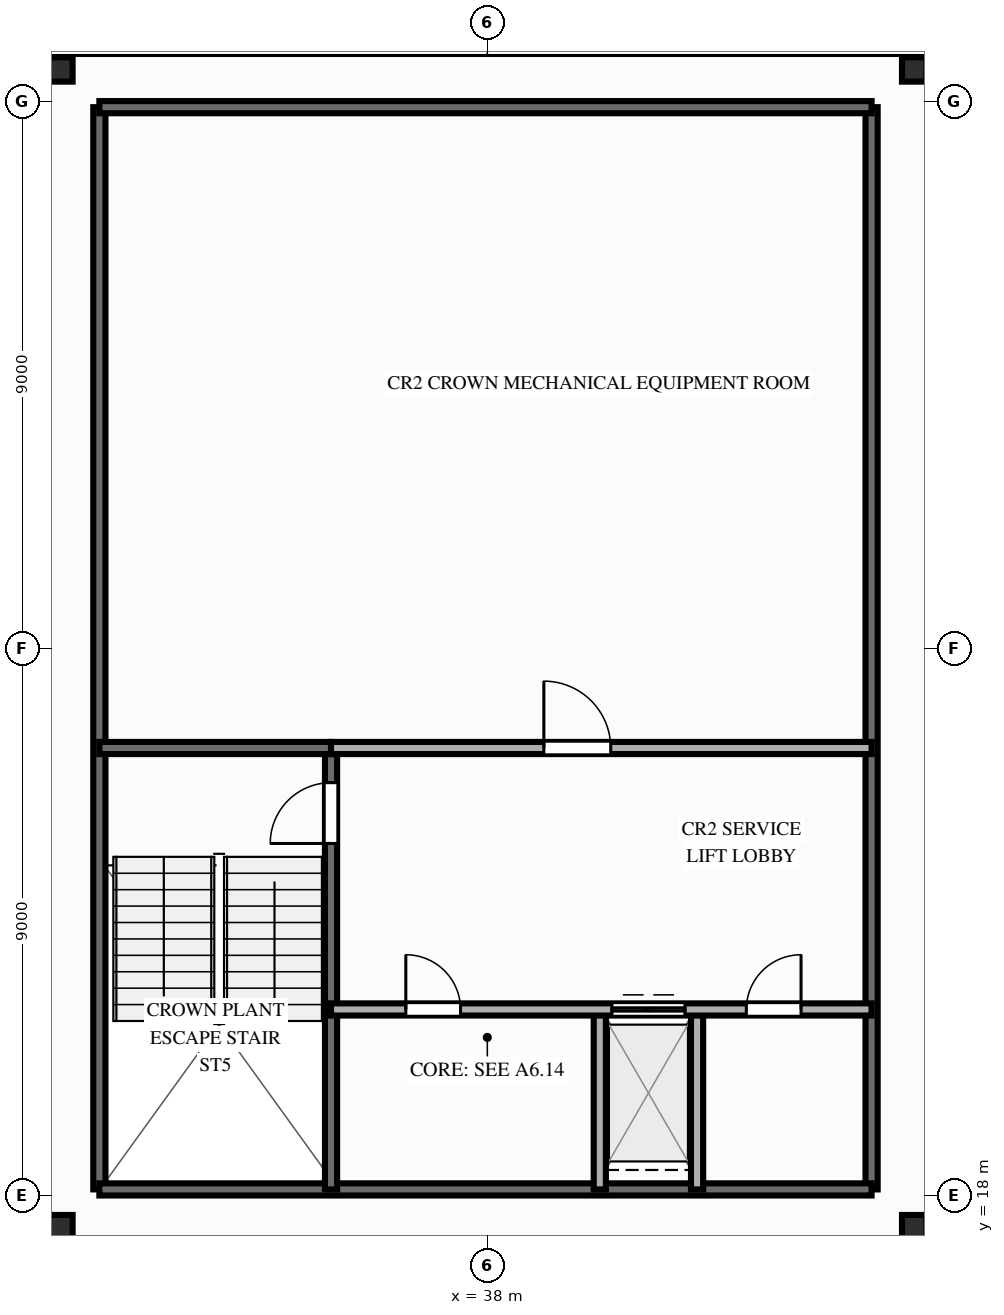
"""IFC4 building model, lengths in metres.
Left out: names, types, materials, properties, quantities, classifications, styles, units other than length and angle.
Written with IfcOpenShell. Run it as: python <this file> out.ifc"""

import sys

from ifc_helpers import new_model, si_unit, direction, frame, frame_2d, origin, origin_2d, place, context, subcontext, project, spatial, rectangle, i_section, extrude, source, transform, mapped, element, fill, save


model = new_model("IFC4")
c1 = context("Model", 3, precision=1e-05, world=origin(), true_north=direction((0.0, 1.0)))
c2 = subcontext(c1, "Body", "Model", "MODEL_VIEW")
j1 = project(units=[si_unit("LENGTHUNIT", "METRE"), si_unit("PLANEANGLEUNIT", "RADIAN")], contexts=[c1])
p1 = place(None, origin())
s1 = spatial("IfcSite", under=j1, at=p1, CompositionType="ELEMENT")
p2 = place(p1, origin())
s2 = spatial("IfcBuilding", under=s1, at=p2, CompositionType="ELEMENT")
p3 = place(p2, frame((0.0, 0.0, 256.0)))
s3 = spatial("IfcBuildingStorey", under=s2, at=p3, CompositionType="ELEMENT", Elevation=256.0)
m1 = source(origin(), c2, "Body", "SweptSolid", [
    extrude(i_section(OverallWidth=0.4, OverallDepth=0.4, WebThickness=0.013, FlangeThickness=0.021, at=origin_2d()), origin(), (0.0, 0.0, 1.0), 3.8),
])
for number, where, z_axis, x_axis in (
    (1, (30.98, 17.48, 0.0), (0.0, 0.0, 1.0), (1.0, 0.0, 0.0)),
    (2, (45.02, 17.48, 0.0), (0.0, 0.0, 1.0), (1.0, 0.0, 0.0)),
    (3, (30.98, 36.52, 0.0), (0.0, 0.0, 1.0), (1.0, 0.0, 0.0)),
    (4, (45.02, 36.52, 0.0), (0.0, 0.0, 1.0), (1.0, 0.0, 0.0)),
):
    element("IfcColumn", number, at=place(p3, frame(where, z_axis=z_axis, x_axis=x_axis)), inside=s3, PredefinedType="COLUMN", context=c2, shape_type="MappedRepresentation", body=[
        mapped(m1, transform((0.0, 0.0, 0.0), scale=1.0)),
    ])
for number, where, z_axis, x_axis in (
    (5, (31.62, 18.1, 0.0), (0.0, 0.0, 1.0), (0.0, 1.0, 0.0)),
    (6, (44.32, 18.1, 0.0), (0.0, 0.0, 1.0), (0.0, 1.0, 0.0)),
):
    element("IfcWall", number, at=place(p3, frame(where, z_axis=z_axis, x_axis=x_axis)), inside=s3, PredefinedType="SOLIDWALL", context=c2, shape_type="SweptSolid", body=[
        extrude(rectangle(XDim=17.8, YDim=0.2, at=frame_2d((8.9, 0.0))), origin(), (0.0, 0.0, 1.0), 3.55),
    ])
for number, where, z_axis, x_axis in (
    (7, (31.62, 18.1, 0.0), (0.0, 0.0, 1.0), (1.0, 0.0, 0.0)),
    (8, (31.62, 35.9, 0.0), (0.0, 0.0, 1.0), (1.0, 0.0, 0.0)),
):
    element("IfcWall", number, at=place(p3, frame(where, z_axis=z_axis, x_axis=x_axis)), inside=s3, PredefinedType="SOLIDWALL", context=c2, shape_type="SweptSolid", body=[
        extrude(rectangle(XDim=12.7, YDim=0.2, at=frame_2d((6.35, 0.0))), origin(), (0.0, 0.0, 1.0), 3.55),
    ])
p4 = place(p3, frame((35.43, 18.1, 0.0), z_axis=(0.0, 0.0, 1.0), x_axis=(0.0, 1.0, 0.0)))
e9 = element("IfcWall", 9, at=p4, inside=s3, PredefinedType="SOLIDWALL", context=c2, shape_type="SweptSolid", body=[
    extrude(rectangle(XDim=7.26, YDim=0.2, at=frame_2d((3.63, 0.0))), origin(), (0.0, 0.0, 1.0), 3.55),
])
p5 = place(p4, frame((6.69, 0.0, 0.0), z_axis=(0.0, 0.0, 1.0), x_axis=(-1.0, 0.0, 0.0)))
e10 = element("IfcOpeningElement", 10, at=p5, cuts=e9, PredefinedType="OPENING", context=c2, shape_type="SweptSolid", body=[
    extrude(rectangle(XDim=1.0, YDim=2.15, at=frame_2d((0.5, 1.075))), frame((0.0, 0.112, 0.0), z_axis=(0.0, -1.0, 0.0), x_axis=(1.0, 0.0, 0.0)), (0.0, 0.0, 1.0), 0.224),
])
p6 = place(p3, frame((31.62, 25.36, 0.0), z_axis=(0.0, 0.0, 1.0), x_axis=(1.0, 0.0, 0.0)))
e11 = element("IfcWall", 11, at=p6, inside=s3, PredefinedType="SOLIDWALL", context=c2, shape_type="SweptSolid", body=[
    extrude(rectangle(XDim=3.81, YDim=0.2, at=frame_2d((1.905, 0.0))), origin(), (0.0, 0.0, 1.0), 3.55),
])
for number, where, z_axis, x_axis in (
    (12, (39.85, 18.1, 0.0), (0.0, 0.0, 1.0), (0.0, 1.0, 0.0)),
    (13, (41.45, 18.1, 0.0), (0.0, 0.0, 1.0), (0.0, 1.0, 0.0)),
):
    element("IfcWall", number, at=place(p3, frame(where, z_axis=z_axis, x_axis=x_axis)), inside=s3, PredefinedType="PARTITIONING", context=c2, shape_type="SweptSolid", body=[
        extrude(rectangle(XDim=2.96, YDim=0.2, at=frame_2d((1.48, 0.0))), origin(), (0.0, 0.0, 1.0), 3.55),
    ])
p7 = place(p3, frame((35.43, 21.06, 0.0), z_axis=(0.0, 0.0, 1.0), x_axis=(1.0, 0.0, 0.0)))
e14 = element("IfcWall", 14, at=p7, inside=s3, PredefinedType="PARTITIONING", context=c2, shape_type="SweptSolid", body=[
    extrude(rectangle(XDim=8.89, YDim=0.2, at=frame_2d((4.445, 0.0))), origin(), (0.0, 0.0, 1.0), 3.55),
])
p8 = place(p7, frame((1.23, 0.0, 0.0)))
e15 = element("IfcOpeningElement", 15, at=p8, cuts=e14, PredefinedType="OPENING", context=c2, shape_type="SweptSolid", body=[
    extrude(rectangle(XDim=0.9, YDim=2.1, at=frame_2d((0.45, 1.05))), frame((0.0, 0.112, 0.0), z_axis=(0.0, -1.0, 0.0), x_axis=(1.0, 0.0, 0.0)), (0.0, 0.0, 1.0), 0.224),
])
p9 = place(p7, frame((4.62, 0.0, 0.0)))
e16 = element("IfcOpeningElement", 16, at=p9, cuts=e14, PredefinedType="OPENING", context=c2, shape_type="SweptSolid", body=[
    extrude(rectangle(XDim=1.2, YDim=2.15, at=frame_2d((0.6, 1.075))), frame((0.0, 0.112, 0.0), z_axis=(0.0, -1.0, 0.0), x_axis=(1.0, 0.0, 0.0)), (0.0, 0.0, 1.0), 0.224),
])
p10 = place(p7, frame((6.83, 0.0, 0.0)))
e17 = element("IfcOpeningElement", 17, at=p10, cuts=e14, PredefinedType="OPENING", context=c2, shape_type="SweptSolid", body=[
    extrude(rectangle(XDim=0.9, YDim=2.1, at=frame_2d((0.45, 1.05))), frame((0.0, 0.112, 0.0), z_axis=(0.0, -1.0, 0.0), x_axis=(1.0, 0.0, 0.0)), (0.0, 0.0, 1.0), 0.224),
])
p11 = place(p3, frame((35.43, 25.36, 0.0), z_axis=(0.0, 0.0, 1.0), x_axis=(1.0, 0.0, 0.0)))
e18 = element("IfcWall", 18, at=p11, inside=s3, PredefinedType="PARTITIONING", context=c2, shape_type="SweptSolid", body=[
    extrude(rectangle(XDim=8.89, YDim=0.2, at=frame_2d((4.445, 0.0))), origin(), (0.0, 0.0, 1.0), 2.952),
])
p12 = place(p11, frame((3.5, 0.0, 0.0)))
e19 = element("IfcOpeningElement", 19, at=p12, cuts=e18, PredefinedType="OPENING", context=c2, shape_type="SweptSolid", body=[
    extrude(rectangle(XDim=1.1, YDim=2.15, at=frame_2d((0.55, 1.075))), frame((0.0, 0.112, 0.0), z_axis=(0.0, -1.0, 0.0), x_axis=(1.0, 0.0, 0.0)), (0.0, 0.0, 1.0), 0.224),
])
m2 = source(origin(), c2, "Body", "SweptSolid", [
    extrude(rectangle(XDim=1.0, YDim=2.15, at=frame_2d((0.5, 1.075))), frame((0.0, 0.025, 0.0), z_axis=(0.0, -1.0, 0.0), x_axis=(1.0, 0.0, 0.0)), (0.0, 0.0, 1.0), 0.05),
])
p13 = place(p5, origin())
e20 = element("IfcDoor", 20, at=p13, inside=s3, OperationType="SINGLE_SWING_RIGHT", PredefinedType="DOOR", context=c2, shape_type="MappedRepresentation", body=[
    mapped(m2, transform((0.0, 0.0, 0.0), scale=1.0)),
])
fill(e10, e20)
m3 = source(origin(), c2, "Body", "SweptSolid", [
    extrude(rectangle(XDim=0.9, YDim=2.1, at=frame_2d((0.45, 1.05))), frame((0.0, 0.025, 0.0), z_axis=(0.0, -1.0, 0.0), x_axis=(1.0, 0.0, 0.0)), (0.0, 0.0, 1.0), 0.05),
])
p14 = place(p8, origin())
e21 = element("IfcDoor", 21, at=p14, inside=s3, OperationType="SINGLE_SWING_LEFT", PredefinedType="DOOR", context=c2, shape_type="MappedRepresentation", body=[
    mapped(m3, transform((0.0, 0.0, 0.0), scale=1.0)),
])
fill(e15, e21)
m4 = source(origin(), c2, "Body", "SweptSolid", [
    extrude(rectangle(XDim=1.2, YDim=2.15, at=frame_2d((0.6, 1.075))), frame((0.0, 0.025, 0.0), z_axis=(0.0, -1.0, 0.0), x_axis=(1.0, 0.0, 0.0)), (0.0, 0.0, 1.0), 0.05),
])
p15 = place(p9, origin())
e22 = element("IfcDoor", 22, at=p15, inside=s3, OperationType="DOUBLE_DOOR_SLIDING", PredefinedType="DOOR", context=c2, shape_type="MappedRepresentation", body=[
    mapped(m4, transform((0.0, 0.0, 0.0), scale=1.0)),
])
fill(e16, e22)
p16 = place(p10, origin())
e23 = element("IfcDoor", 23, at=p16, inside=s3, OperationType="SINGLE_SWING_RIGHT", PredefinedType="DOOR", context=c2, shape_type="MappedRepresentation", body=[
    mapped(m3, transform((0.0, 0.0, 0.0), scale=1.0)),
])
fill(e17, e23)
m5 = source(origin(), c2, "Body", "SweptSolid", [
    extrude(rectangle(XDim=1.1, YDim=2.15, at=frame_2d((0.55, 1.075))), frame((0.0, 0.025, 0.0), z_axis=(0.0, -1.0, 0.0), x_axis=(1.0, 0.0, 0.0)), (0.0, 0.0, 1.0), 0.05),
])
p17 = place(p12, origin())
e24 = element("IfcDoor", 24, at=p17, inside=s3, OperationType="SINGLE_SWING_LEFT", PredefinedType="DOOR", context=c2, shape_type="MappedRepresentation", body=[
    mapped(m5, transform((0.0, 0.0, 0.0), scale=1.0)),
])
fill(e19, e24)
save(model, sys.argv[1])
